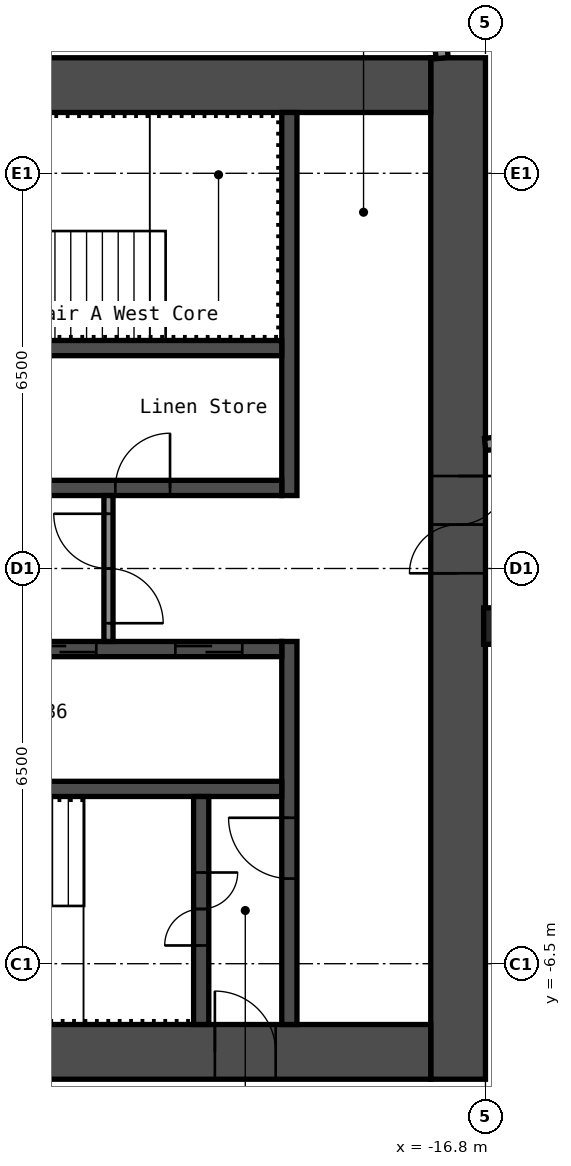
"""IFC4 building model, lengths in metres.
Left out: names, types, materials, properties, quantities, classifications, styles, units other than length and angle.
Written with IfcOpenShell. Run it as: python <this file> out.ifc"""

import sys

from ifc_helpers import new_model, si_unit, direction, frame, frame_2d, origin, origin_2d, place, context, subcontext, project, spatial, rectangle, hollow_rectangle, extrude, element, fill, save


model = new_model("IFC4")
c1 = context("Model", 3, precision=1e-05, world=origin(), true_north=direction((0.0, 1.0)))
c2 = subcontext(c1, "Body", "Model", "MODEL_VIEW")
j1 = project(units=[si_unit("LENGTHUNIT", "METRE"), si_unit("PLANEANGLEUNIT", "RADIAN")], contexts=[c1])
p1 = place(None, origin())
s1 = spatial("IfcSite", under=j1, at=p1, CompositionType="ELEMENT")
p2 = place(p1, origin())
s2 = spatial("IfcBuilding", under=s1, at=p2, CompositionType="ELEMENT")
p3 = place(p2, frame((0.0, 0.0, 251.8)))
s3 = spatial("IfcBuildingStorey", under=s2, at=p3, CompositionType="ELEMENT", Elevation=251.8)
p4 = place(p3, frame((-16.53, -0.947, 0.0), z_axis=(0.0, 0.0, 1.0), x_axis=(1.0, 0.0, 0.0)))
e1 = element("IfcColumn", 1, at=p4, inside=s3, PredefinedType="COLUMN", context=c2, shape_type="SweptSolid", body=[
    extrude(hollow_rectangle(XDim=0.6, YDim=0.6, WallThickness=0.025, InnerFilletRadius=0.038, OuterFilletRadius=0.062, at=origin_2d()), origin(), (0.0, 0.0, 1.0), 2.75),
])
p5 = place(p3, frame((-17.25, -8.4, 0.0), z_axis=(0.0, 0.0, 1.0), x_axis=(0.0, 1.0, 0.0)))
e2 = element("IfcWall", 2, at=p5, inside=s3, PredefinedType="SHEAR", context=c2, shape_type="SweptSolid", body=[
    extrude(rectangle(XDim=16.8, YDim=0.9, at=frame_2d((8.4, 0.0))), origin(), (0.0, 0.0, 1.0), 2.75),
])
p6 = place(p5, frame((8.321, 0.0, 0.0)))
e3 = element("IfcOpeningElement", 3, at=p6, cuts=e2, PredefinedType="OPENING", context=c2, shape_type="SweptSolid", body=[
    extrude(rectangle(XDim=1.6, YDim=2.1, at=frame_2d((0.8, 1.05))), frame((0.0, 0.46, 0.0), z_axis=(0.0, -1.0, 0.0), x_axis=(1.0, 0.0, 0.0)), (0.0, 0.0, 1.0), 0.92),
])
p7 = place(p3, frame((-32.7, 7.95, 0.0), z_axis=(0.0, 0.0, 1.0), x_axis=(1.0, 0.0, 0.0)))
e4 = element("IfcWall", 4, at=p7, inside=s3, PredefinedType="SHEAR", context=c2, shape_type="SweptSolid", body=[
    extrude(rectangle(XDim=15.0, YDim=0.9, at=frame_2d((7.5, 0.0))), origin(), (0.0, 0.0, 1.0), 2.75),
])
p8 = place(p7, frame((3.4, 0.0, 0.0)))
e5 = element("IfcOpeningElement", 5, at=p8, cuts=e4, PredefinedType="OPENING", context=c2, shape_type="SweptSolid", body=[
    extrude(rectangle(XDim=1.2, YDim=2.1, at=frame_2d((0.6, 1.05))), frame((0.0, 0.46, 0.0), z_axis=(0.0, -1.0, 0.0), x_axis=(1.0, 0.0, 0.0)), (0.0, 0.0, 1.0), 0.92),
])
p9 = place(p7, frame((0.75, 0.0, 0.0)))
e6 = element("IfcOpeningElement", 6, at=p9, cuts=e4, PredefinedType="OPENING", context=c2, shape_type="SweptSolid", body=[
    extrude(rectangle(XDim=0.9, YDim=2.1, at=frame_2d((0.45, 1.05))), frame((0.0, 0.46, 0.0), z_axis=(0.0, -1.0, 0.0), x_axis=(1.0, 0.0, 0.0)), (0.0, 0.0, 1.0), 0.92),
])
p10 = place(p3, frame((-32.7, -7.95, 0.0), z_axis=(0.0, 0.0, 1.0), x_axis=(1.0, 0.0, 0.0)))
e7 = element("IfcWall", 7, at=p10, inside=s3, PredefinedType="SHEAR", context=c2, shape_type="SweptSolid", body=[
    extrude(rectangle(XDim=15.0, YDim=0.9, at=frame_2d((7.5, 0.0))), origin(), (0.0, 0.0, 1.0), 2.75),
])
p11 = place(p10, frame((11.45, 0.0, 0.0)))
e8 = element("IfcOpeningElement", 8, at=p11, cuts=e7, PredefinedType="OPENING", context=c2, shape_type="SweptSolid", body=[
    extrude(rectangle(XDim=1.0, YDim=2.1, at=frame_2d((0.5, 1.05))), frame((0.0, 0.46, 0.0), z_axis=(0.0, -1.0, 0.0), x_axis=(1.0, 0.0, 0.0)), (0.0, 0.0, 1.0), 0.92),
])
p12 = place(p3, frame((-20.025, 1.2, 0.0), z_axis=(0.0, 0.0, 1.0), x_axis=(0.0, 1.0, 0.0)))
e9 = element("IfcWall", 9, at=p12, inside=s3, PredefinedType="SHEAR", context=c2, shape_type="SweptSolid", body=[
    extrude(rectangle(XDim=6.3, YDim=0.25, at=frame_2d((3.15, 0.0))), origin(), (0.0, 0.0, 1.0), 2.75),
])
p13 = place(p3, frame((-20.025, -7.5, 0.0), z_axis=(0.0, 0.0, 1.0), x_axis=(0.0, 1.0, 0.0)))
e10 = element("IfcWall", 10, at=p13, inside=s3, PredefinedType="SHEAR", context=c2, shape_type="SweptSolid", body=[
    extrude(rectangle(XDim=6.3, YDim=0.25, at=frame_2d((3.15, 0.0))), origin(), (0.0, 0.0, 1.0), 2.75),
])
p14 = place(p13, frame((2.4, 0.0, 0.0)))
e11 = element("IfcOpeningElement", 11, at=p14, cuts=e10, PredefinedType="OPENING", context=c2, shape_type="SweptSolid", body=[
    extrude(rectangle(XDim=1.0, YDim=2.1, at=frame_2d((0.5, 1.05))), frame((0.0, 0.135, 0.0), z_axis=(0.0, -1.0, 0.0), x_axis=(1.0, 0.0, 0.0)), (0.0, 0.0, 1.0), 0.27),
])
p15 = place(p3, frame((-27.65, 1.325, 0.0), z_axis=(0.0, 0.0, 1.0), x_axis=(1.0, 0.0, 0.0)))
e12 = element("IfcWall", 12, at=p15, inside=s3, PredefinedType="SHEAR", context=c2, shape_type="SweptSolid", body=[
    extrude(rectangle(XDim=7.5, YDim=0.25, at=frame_2d((3.75, 0.0))), origin(), (0.0, 0.0, 1.0), 2.75),
])
p16 = place(p15, frame((4.762, 0.0, 0.0)))
e13 = element("IfcOpeningElement", 13, at=p16, cuts=e12, PredefinedType="OPENING", context=c2, shape_type="SweptSolid", body=[
    extrude(rectangle(XDim=0.9, YDim=2.1, at=frame_2d((0.45, 1.05))), frame((0.0, 0.135, 0.0), z_axis=(0.0, -1.0, 0.0), x_axis=(1.0, 0.0, 0.0)), (0.0, 0.0, 1.0), 0.27),
])
p17 = place(p15, frame((1.062, 0.0, 0.0)))
e14 = element("IfcOpeningElement", 14, at=p17, cuts=e12, PredefinedType="OPENING", context=c2, shape_type="SweptSolid", body=[
    extrude(rectangle(XDim=0.9, YDim=2.1, at=frame_2d((0.45, 1.05))), frame((0.0, 0.135, 0.0), z_axis=(0.0, -1.0, 0.0), x_axis=(1.0, 0.0, 0.0)), (0.0, 0.0, 1.0), 0.27),
])
p18 = place(p3, frame((-27.65, 3.625, 0.0), z_axis=(0.0, 0.0, 1.0), x_axis=(1.0, 0.0, 0.0)))
e15 = element("IfcWall", 15, at=p18, inside=s3, PredefinedType="SHEAR", context=c2, shape_type="SweptSolid", body=[
    extrude(rectangle(XDim=7.5, YDim=0.25, at=frame_2d((3.75, 0.0))), origin(), (0.0, 0.0, 1.0), 2.75),
])
p19 = place(p3, frame((-27.65, -1.325, 0.0), z_axis=(0.0, 0.0, 1.0), x_axis=(1.0, 0.0, 0.0)))
e16 = element("IfcWall", 16, at=p19, inside=s3, PredefinedType="SHEAR", context=c2, shape_type="SweptSolid", body=[
    extrude(rectangle(XDim=7.5, YDim=0.25, at=frame_2d((3.75, 0.0))), origin(), (0.0, 0.0, 1.0), 2.75),
])
p20 = place(p19, frame((5.75, 0.0, 0.0)))
e17 = element("IfcOpeningElement", 17, at=p20, cuts=e16, PredefinedType="OPENING", context=c2, shape_type="SweptSolid", body=[
    extrude(rectangle(XDim=1.1, YDim=2.1, at=frame_2d((0.55, 1.05))), frame((0.0, 0.135, 0.0), z_axis=(0.0, -1.0, 0.0), x_axis=(1.0, 0.0, 0.0)), (0.0, 0.0, 1.0), 0.27),
])
p21 = place(p19, frame((3.35, 0.0, 0.0)))
e18 = element("IfcOpeningElement", 18, at=p21, cuts=e16, PredefinedType="OPENING", context=c2, shape_type="SweptSolid", body=[
    extrude(rectangle(XDim=1.1, YDim=2.1, at=frame_2d((0.55, 1.05))), frame((0.0, 0.135, 0.0), z_axis=(0.0, -1.0, 0.0), x_axis=(1.0, 0.0, 0.0)), (0.0, 0.0, 1.0), 0.27),
])
p22 = place(p19, frame((0.95, 0.0, 0.0)))
e19 = element("IfcOpeningElement", 19, at=p22, cuts=e16, PredefinedType="OPENING", context=c2, shape_type="SweptSolid", body=[
    extrude(rectangle(XDim=1.1, YDim=2.1, at=frame_2d((0.55, 1.05))), frame((0.0, 0.135, 0.0), z_axis=(0.0, -1.0, 0.0), x_axis=(1.0, 0.0, 0.0)), (0.0, 0.0, 1.0), 0.27),
])
p23 = place(p3, frame((-27.65, -3.625, 0.0), z_axis=(0.0, 0.0, 1.0), x_axis=(1.0, 0.0, 0.0)))
e20 = element("IfcWall", 20, at=p23, inside=s3, PredefinedType="SHEAR", context=c2, shape_type="SweptSolid", body=[
    extrude(rectangle(XDim=7.5, YDim=0.25, at=frame_2d((3.75, 0.0))), origin(), (0.0, 0.0, 1.0), 2.75),
])
p24 = place(p3, frame((-21.475, -7.5, 0.0), z_axis=(0.0, 0.0, 1.0), x_axis=(0.0, 1.0, 0.0)))
e21 = element("IfcWall", 21, at=p24, inside=s3, PredefinedType="SHEAR", context=c2, shape_type="SweptSolid", body=[
    extrude(rectangle(XDim=3.75, YDim=0.25, at=frame_2d((1.875, 0.0))), origin(), (0.0, 0.0, 1.0), 2.75),
])
p25 = place(p24, frame((1.3, 0.0, 0.0)))
e22 = element("IfcOpeningElement", 22, at=p25, cuts=e21, PredefinedType="OPENING", context=c2, shape_type="SweptSolid", body=[
    extrude(rectangle(XDim=1.2, YDim=2.1, at=frame_2d((0.6, 1.05))), frame((0.0, 0.135, 0.0), z_axis=(0.0, -1.0, 0.0), x_axis=(1.0, 0.0, 0.0)), (0.0, 0.0, 1.0), 0.27),
])
p26 = place(p3, frame((-23.0, -1.2, 0.0), z_axis=(0.0, 0.0, 1.0), x_axis=(0.0, 1.0, 0.0)))
e23 = element("IfcWall", 23, at=p26, inside=s3, PredefinedType="PARTITIONING", context=c2, shape_type="SweptSolid", body=[
    extrude(rectangle(XDim=2.4, YDim=0.15, at=frame_2d((1.2, 0.0))), origin(), (0.0, 0.0, 1.0), 2.75),
])
p27 = place(p26, frame((0.3, 0.0, 0.0)))
e24 = element("IfcOpeningElement", 24, at=p27, cuts=e23, PredefinedType="OPENING", context=c2, shape_type="SweptSolid", body=[
    extrude(rectangle(XDim=1.8, YDim=2.1, at=frame_2d((0.9, 1.05))), frame((0.0, 0.085, 0.0), z_axis=(0.0, -1.0, 0.0), x_axis=(1.0, 0.0, 0.0)), (0.0, 0.0, 1.0), 0.17),
])
p28 = place(p3, frame((-16.805, 2.041, 0.0), z_axis=(0.0, 0.0, 1.0), x_axis=(0.994521146831, 0.104535584879, 0.0)))
e25 = element("IfcWall", 25, at=p28, inside=s3, PredefinedType="PARTITIONING", context=c2, shape_type="SweptSolid", body=[
    extrude(rectangle(XDim=33.561, YDim=0.2, at=frame_2d((16.78, 0.0))), origin(), (0.0, 0.0, 1.0), 2.75),
])
p29 = place(p28, frame((1.946, 0.0, 0.0)))
e26 = element("IfcOpeningElement", 26, at=p29, cuts=e25, PredefinedType="OPENING", context=c2, shape_type="SweptSolid", body=[
    extrude(rectangle(XDim=0.9, YDim=2.1, at=frame_2d((0.45, 1.05))), frame((0.0, 0.11, 0.0), z_axis=(0.0, -1.0, 0.0), x_axis=(1.0, 0.0, 0.0)), (0.0, 0.0, 1.0), 0.22),
])
p30 = place(p28, frame((6.146, 0.0, 0.0)))
e27 = element("IfcOpeningElement", 27, at=p30, cuts=e25, PredefinedType="OPENING", context=c2, shape_type="SweptSolid", body=[
    extrude(rectangle(XDim=0.9, YDim=2.1, at=frame_2d((0.45, 1.05))), frame((0.0, 0.11, 0.0), z_axis=(0.0, -1.0, 0.0), x_axis=(1.0, 0.0, 0.0)), (0.0, 0.0, 1.0), 0.22),
])
p31 = place(p28, frame((10.516, 0.0, 0.0)))
e28 = element("IfcOpeningElement", 28, at=p31, cuts=e25, PredefinedType="OPENING", context=c2, shape_type="SweptSolid", body=[
    extrude(rectangle(XDim=0.9, YDim=2.1, at=frame_2d((0.45, 1.05))), frame((0.0, 0.11, 0.0), z_axis=(0.0, -1.0, 0.0), x_axis=(1.0, 0.0, 0.0)), (0.0, 0.0, 1.0), 0.22),
])
p32 = place(p28, frame((14.716, 0.0, 0.0)))
e29 = element("IfcOpeningElement", 29, at=p32, cuts=e25, PredefinedType="OPENING", context=c2, shape_type="SweptSolid", body=[
    extrude(rectangle(XDim=0.9, YDim=2.1, at=frame_2d((0.45, 1.05))), frame((0.0, 0.11, 0.0), z_axis=(0.0, -1.0, 0.0), x_axis=(1.0, 0.0, 0.0)), (0.0, 0.0, 1.0), 0.22),
])
p33 = place(p28, frame((19.001, 0.0, 0.0)))
e30 = element("IfcOpeningElement", 30, at=p33, cuts=e25, PredefinedType="OPENING", context=c2, shape_type="SweptSolid", body=[
    extrude(rectangle(XDim=0.9, YDim=2.1, at=frame_2d((0.45, 1.05))), frame((0.0, 0.11, 0.0), z_axis=(0.0, -1.0, 0.0), x_axis=(1.0, 0.0, 0.0)), (0.0, 0.0, 1.0), 0.22),
])
p34 = place(p28, frame((23.201, 0.0, 0.0)))
e31 = element("IfcOpeningElement", 31, at=p34, cuts=e25, PredefinedType="OPENING", context=c2, shape_type="SweptSolid", body=[
    extrude(rectangle(XDim=0.9, YDim=2.1, at=frame_2d((0.45, 1.05))), frame((0.0, 0.11, 0.0), z_axis=(0.0, -1.0, 0.0), x_axis=(1.0, 0.0, 0.0)), (0.0, 0.0, 1.0), 0.22),
])
p35 = place(p28, frame((28.861, 0.0, 0.0)))
e32 = element("IfcOpeningElement", 32, at=p35, cuts=e25, PredefinedType="OPENING", context=c2, shape_type="SweptSolid", body=[
    extrude(rectangle(XDim=1.0, YDim=2.1, at=frame_2d((0.5, 1.05))), frame((0.0, 0.11, 0.0), z_axis=(0.0, -1.0, 0.0), x_axis=(1.0, 0.0, 0.0)), (0.0, 0.0, 1.0), 0.22),
])
p36 = place(p3, frame((-17.512, 8.395, 0.0), z_axis=(0.0, 0.0, 1.0), x_axis=(-0.104524714473, 0.994522289375, 0.0)))
e33 = element("IfcWall", 33, at=p36, inside=s3, PredefinedType="PARTITIONING", context=c2, shape_type="SweptSolid", body=[
    extrude(rectangle(XDim=9.607, YDim=0.2, at=frame_2d((4.803, 0.0))), origin(), (0.0, 0.0, 1.0), 2.75),
])
p37 = place(p6, origin())
e34 = element("IfcDoor", 34, at=p37, inside=s3, OperationType="DOUBLE_DOOR_SINGLE_SWING", PredefinedType="DOOR", context=c2, shape_type="SweptSolid", body=[
    extrude(rectangle(XDim=1.6, YDim=2.1, at=frame_2d((0.8, 1.05))), frame((0.0, 0.025, 0.0), z_axis=(0.0, -1.0, 0.0), x_axis=(1.0, 0.0, 0.0)), (0.0, 0.0, 1.0), 0.05),
])
fill(e3, e34)
p38 = place(p11, origin())
e35 = element("IfcDoor", 35, at=p38, inside=s3, OperationType="SINGLE_SWING_RIGHT", PredefinedType="DOOR", context=c2, shape_type="SweptSolid", body=[
    extrude(rectangle(XDim=1.0, YDim=2.1, at=frame_2d((0.5, 1.05))), frame((0.0, 0.025, 0.0), z_axis=(0.0, -1.0, 0.0), x_axis=(1.0, 0.0, 0.0)), (0.0, 0.0, 1.0), 0.05),
])
fill(e8, e35)
p39 = place(p25, origin())
e36 = element("IfcDoor", 36, at=p39, inside=s3, OperationType="DOUBLE_DOOR_SINGLE_SWING", PredefinedType="DOOR", context=c2, shape_type="SweptSolid", body=[
    extrude(rectangle(XDim=1.2, YDim=2.1, at=frame_2d((0.6, 1.05))), frame((0.0, 0.025, 0.0), z_axis=(0.0, -1.0, 0.0), x_axis=(1.0, 0.0, 0.0)), (0.0, 0.0, 1.0), 0.05),
])
fill(e22, e36)
p40 = place(p14, origin())
e37 = element("IfcDoor", 37, at=p40, inside=s3, OperationType="SINGLE_SWING_LEFT", PredefinedType="DOOR", context=c2, shape_type="SweptSolid", body=[
    extrude(rectangle(XDim=1.0, YDim=2.1, at=frame_2d((0.5, 1.05))), frame((0.0, 0.025, 0.0), z_axis=(0.0, -1.0, 0.0), x_axis=(1.0, 0.0, 0.0)), (0.0, 0.0, 1.0), 0.05),
])
fill(e11, e37)
p41 = place(p27, origin())
e38 = element("IfcDoor", 38, at=p41, inside=s3, OperationType="DOUBLE_DOOR_SINGLE_SWING", PredefinedType="DOOR", context=c2, shape_type="SweptSolid", body=[
    extrude(rectangle(XDim=1.8, YDim=2.1, at=frame_2d((0.9, 1.05))), frame((0.0, 0.025, 0.0), z_axis=(0.0, -1.0, 0.0), x_axis=(1.0, 0.0, 0.0)), (0.0, 0.0, 1.0), 0.05),
])
fill(e24, e38)
p42 = place(p16, origin())
e39 = element("IfcDoor", 39, at=p42, inside=s3, OperationType="SINGLE_SWING_LEFT", PredefinedType="DOOR", context=c2, shape_type="SweptSolid", body=[
    extrude(rectangle(XDim=0.9, YDim=2.1, at=frame_2d((0.45, 1.05))), frame((0.0, 0.025, 0.0), z_axis=(0.0, -1.0, 0.0), x_axis=(1.0, 0.0, 0.0)), (0.0, 0.0, 1.0), 0.05),
])
fill(e13, e39)
p43 = place(p20, origin())
e40 = element("IfcDoor", 40, at=p43, inside=s3, OperationType="DOUBLE_DOOR_SLIDING", PredefinedType="DOOR", context=c2, shape_type="SweptSolid", body=[
    extrude(rectangle(XDim=1.1, YDim=2.1, at=frame_2d((0.55, 1.05))), frame((0.0, 0.025, 0.0), z_axis=(0.0, -1.0, 0.0), x_axis=(1.0, 0.0, 0.0)), (0.0, 0.0, 1.0), 0.05),
])
fill(e17, e40)
p44 = place(p21, origin())
e41 = element("IfcDoor", 41, at=p44, inside=s3, OperationType="DOUBLE_DOOR_SLIDING", PredefinedType="DOOR", context=c2, shape_type="SweptSolid", body=[
    extrude(rectangle(XDim=1.1, YDim=2.1, at=frame_2d((0.55, 1.05))), frame((0.0, 0.025, 0.0), z_axis=(0.0, -1.0, 0.0), x_axis=(1.0, 0.0, 0.0)), (0.0, 0.0, 1.0), 0.05),
])
fill(e18, e41)
save(model, sys.argv[1])
